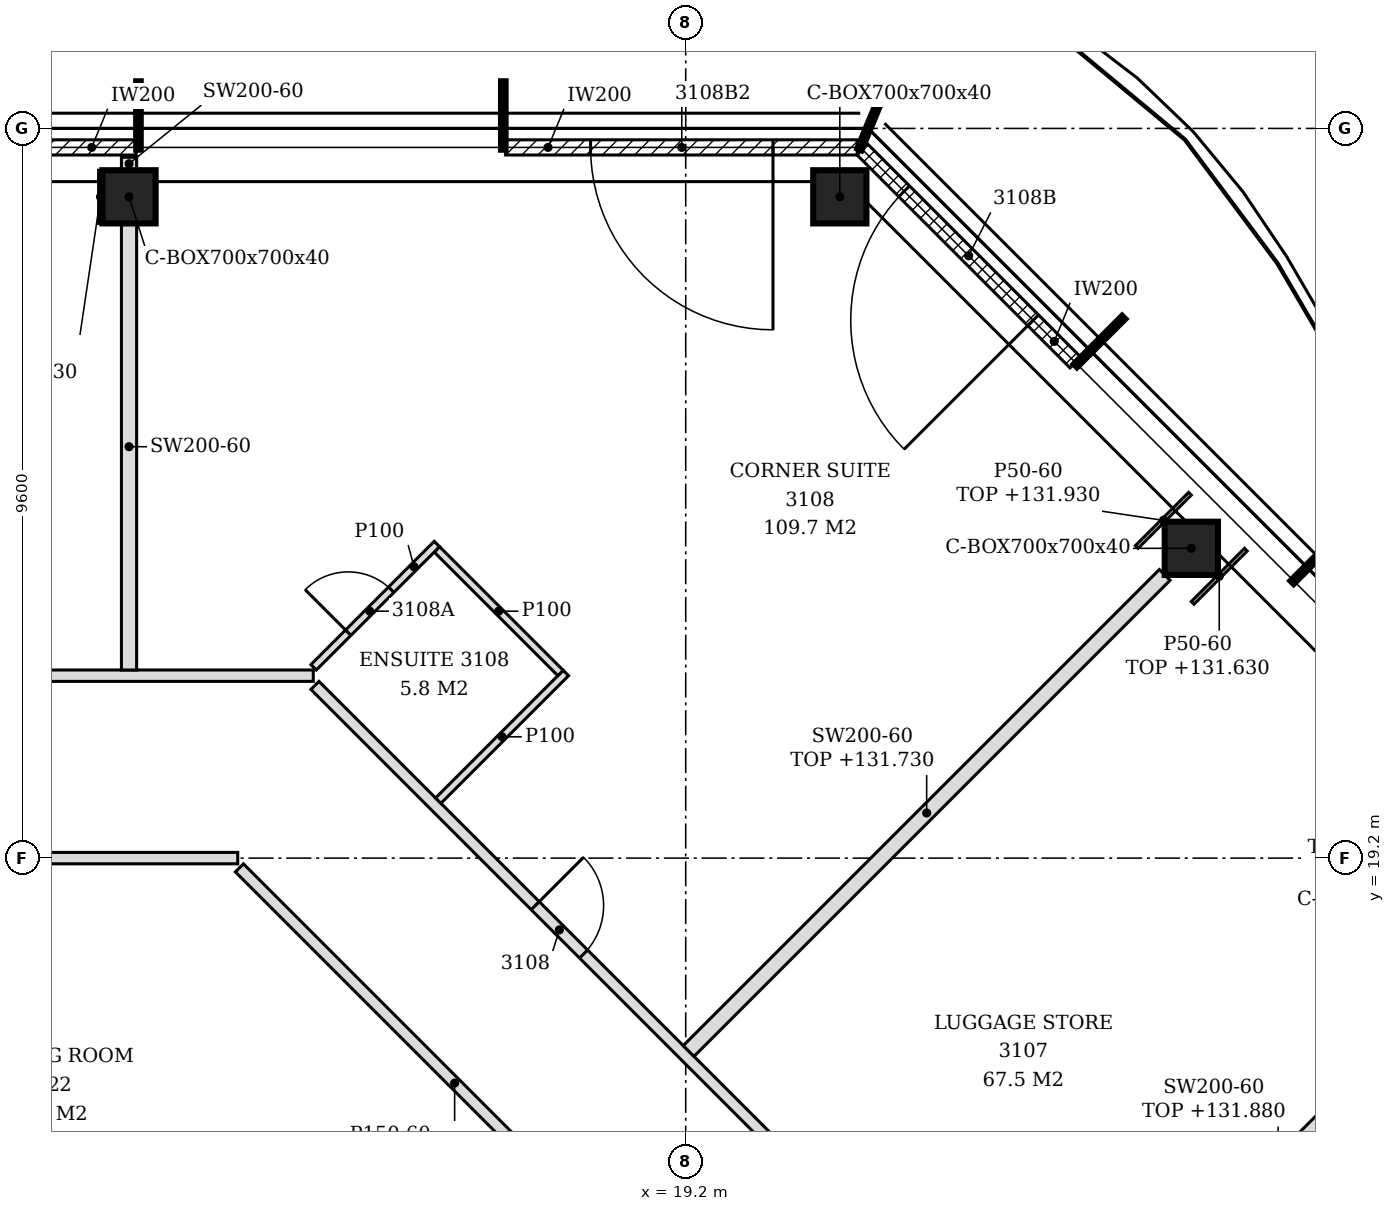
"""IFC4 building model, lengths in metres.
Left out: names, types, materials, properties, quantities, classifications, styles, units other than length and angle.
Written with IfcOpenShell. Run it as: python <this file> out.ifc"""

import sys

from ifc_helpers import new_model, si_unit, direction, frame, frame_2d, origin, origin_2d, place, context, subcontext, project, spatial, polyline, rectangle, hollow_rectangle, outline, extrude, element, fill, save


model = new_model("IFC4")
c1 = context("Model", 3, precision=1e-05, world=origin(), true_north=direction((0.0, 1.0)))
c2 = subcontext(c1, "Body", "Model", "MODEL_VIEW")
j1 = project(units=[si_unit("LENGTHUNIT", "METRE"), si_unit("PLANEANGLEUNIT", "RADIAN")], contexts=[c1])
p1 = place(None, origin())
s1 = spatial("IfcSite", under=j1, at=p1, CompositionType="ELEMENT")
p2 = place(p1, origin())
s2 = spatial("IfcBuilding", under=s1, at=p2, CompositionType="ELEMENT")
p3 = place(p2, frame((0.0, 0.0, 129.0)))
s3 = spatial("IfcBuildingStorey", under=s2, at=p3, CompositionType="ELEMENT", Elevation=129.0)
for number, where, z_axis, x_axis in (
    (1, (25.852, 23.276, -0.15), (0.0, 0.0, 1.0), (1.0, 0.0, 0.0)),
    (2, (21.227, 27.9, -0.15), (0.0, 0.0, 1.0), (1.0, 0.0, 0.0)),
    (3, (11.876, 27.9, -0.15), (0.0, 0.0, 1.0), (1.0, 0.0, 0.0)),
):
    element("IfcColumn", number, at=place(p3, frame(where, z_axis=z_axis, x_axis=x_axis)), inside=s3, PredefinedType="COLUMN", context=c2, shape_type="SweptSolid", body=[
        extrude(hollow_rectangle(XDim=0.7, YDim=0.7, WallThickness=0.04, at=origin_2d()), origin(), (0.0, 0.0, 1.0), 3.6),
    ])
p4 = place(p3, frame((24.326, 25.72, 0.0), z_axis=(0.0, 0.0, 1.0), x_axis=(-0.707106781187, 0.707106781187, 0.0)))
e4 = element("IfcWall", 4, at=p4, inside=s3, PredefinedType="NOTDEFINED", context=c2, shape_type="SweptSolid", body=[
    extrude(rectangle(XDim=3.962, YDim=0.2, at=frame_2d((1.981, 0.0))), origin(), (0.0, 0.0, 1.0), 3.45),
])
p5 = place(p4, frame((0.786, 0.0, 0.0)))
e5 = element("IfcOpeningElement", 5, at=p5, cuts=e4, PredefinedType="OPENING", context=c2, shape_type="SweptSolid", body=[
    extrude(rectangle(XDim=2.4, YDim=2.4, at=frame_2d((1.2, 1.2))), frame((0.0, 0.11, 0.0), z_axis=(0.0, -1.0, 0.0), x_axis=(1.0, 0.0, 0.0)), (0.0, 0.0, 1.0), 0.22),
])
p6 = place(p3, frame((21.457, 28.55, 0.0), z_axis=(0.0, 0.0, 1.0), x_axis=(-1.0, 0.0, 0.0)))
e6 = element("IfcWall", 6, at=p6, inside=s3, PredefinedType="NOTDEFINED", context=c2, shape_type="SweptSolid", body=[
    extrude(rectangle(XDim=4.626, YDim=0.2, at=frame_2d((2.313, 0.0))), origin(), (0.0, 0.0, 1.0), 3.45),
])
p7 = place(p6, frame((1.108, 0.0, 0.0)))
e7 = element("IfcOpeningElement", 7, at=p7, cuts=e6, PredefinedType="OPENING", context=c2, shape_type="SweptSolid", body=[
    extrude(rectangle(XDim=2.4, YDim=2.4, at=frame_2d((1.2, 1.2))), frame((0.0, 0.11, 0.0), z_axis=(0.0, -1.0, 0.0), x_axis=(1.0, 0.0, 0.0)), (0.0, 0.0, 1.0), 0.22),
])
p8 = place(p3, frame((11.97, 28.55, 0.0), z_axis=(0.0, 0.0, 1.0), x_axis=(-1.0, 0.0, 0.0)))
e8 = element("IfcWall", 8, at=p8, inside=s3, PredefinedType="NOTDEFINED", context=c2, shape_type="SweptSolid", body=[
    extrude(rectangle(XDim=4.74, YDim=0.2, at=frame_2d((2.37, 0.0))), origin(), (0.0, 0.0, 1.0), 3.45),
])
p9 = place(p8, frame((1.17, 0.0, 0.0)))
e9 = element("IfcOpeningElement", 9, at=p9, cuts=e8, PredefinedType="OPENING", context=c2, shape_type="SweptSolid", body=[
    extrude(rectangle(XDim=2.4, YDim=2.4, at=frame_2d((1.2, 1.2))), frame((0.0, 0.11, 0.0), z_axis=(0.0, -1.0, 0.0), x_axis=(1.0, 0.0, 0.0)), (0.0, 0.0, 1.0), 0.22),
])
p10 = place(p3, frame((31.072, 4.722, 0.0), z_axis=(0.0, 0.0, 1.0), x_axis=(-0.707106781187, 0.707106781187, 0.0)))
e10 = element("IfcWall", 10, at=p10, inside=s3, PredefinedType="PARTITIONING", context=c2, shape_type="SweptSolid", body=[
    extrude(rectangle(XDim=23.688, YDim=0.15, at=frame_2d((11.844, 0.0))), origin(), (0.0, 0.0, 1.0), 2.73),
])
p11 = place(p10, frame((8.135, 0.0, 0.0)))
e11 = element("IfcOpeningElement", 11, at=p11, cuts=e10, PredefinedType="OPENING", context=c2, shape_type="SweptSolid", body=[
    extrude(rectangle(XDim=0.9, YDim=2.1, at=frame_2d((0.45, 1.05))), frame((0.0, 0.085, 0.0), z_axis=(0.0, -1.0, 0.0), x_axis=(1.0, 0.0, 0.0)), (0.0, 0.0, 1.0), 0.17),
])
p12 = place(p10, frame((13.091, 0.0, 0.0)))
e12 = element("IfcOpeningElement", 12, at=p12, cuts=e10, PredefinedType="OPENING", context=c2, shape_type="SweptSolid", body=[
    extrude(rectangle(XDim=0.9, YDim=2.1, at=frame_2d((0.45, 1.05))), frame((0.0, 0.085, 0.0), z_axis=(0.0, -1.0, 0.0), x_axis=(1.0, 0.0, 0.0)), (0.0, 0.0, 1.0), 0.17),
])
p13 = place(p10, frame((18.69, 0.0, 0.0)))
e13 = element("IfcOpeningElement", 13, at=p13, cuts=e10, PredefinedType="OPENING", context=c2, shape_type="SweptSolid", body=[
    extrude(rectangle(XDim=0.9, YDim=2.1, at=frame_2d((0.45, 1.05))), frame((0.0, 0.085, 0.0), z_axis=(0.0, -1.0, 0.0), x_axis=(1.0, 0.0, 0.0)), (0.0, 0.0, 1.0), 0.17),
])
p14 = place(p3, frame((23.862, 12.038, 0.0), z_axis=(0.0, 0.0, 1.0), x_axis=(0.707106781187, 0.707106781187, 0.0)))
e14 = element("IfcWall", 14, at=p14, inside=s3, PredefinedType="PARTITIONING", context=c2, shape_type="SweptSolid", body=[
    extrude(rectangle(XDim=8.858, YDim=0.2, at=frame_2d((4.429, 0.0))), origin(), (0.0, 0.0, 1.0), 2.88),
])
p15 = place(p3, frame((18.991, 13.408, 0.0), z_axis=(0.0, 0.0, 1.0), x_axis=(-0.707106781187, 0.707106781187, 0.0)))
e15 = element("IfcWall", 15, at=p15, inside=s3, PredefinedType="PARTITIONING", context=c2, shape_type="SweptSolid", body=[
    extrude(rectangle(XDim=8.01, YDim=0.15, at=frame_2d((4.005, 0.0))), origin(), (0.0, 0.0, 1.0), 2.88),
])
p16 = place(p3, frame((19.238, 16.662, 0.0), z_axis=(0.0, 0.0, 1.0), x_axis=(0.707120561855, 0.707093000249, 0.0)))
e16 = element("IfcWall", 16, at=p16, inside=s3, PredefinedType="PARTITIONING", context=c2, shape_type="SweptSolid", body=[
    extrude(rectangle(XDim=8.858, YDim=0.2, at=frame_2d((4.429, 0.0))), origin(), (0.0, 0.0, 1.0), 2.73),
])
p17 = place(p3, frame((2.325, 19.2, 0.0), z_axis=(0.0, 0.0, 1.0), x_axis=(1.0, 0.0, 0.0)))
e17 = element("IfcWall", 17, at=p17, inside=s3, PredefinedType="PARTITIONING", context=c2, shape_type="SweptSolid", body=[
    extrude(outline(polyline([(0.0, 0.0), (10.981, 0.0), (10.981, 2.88), (5.025, 2.88), (5.023, 2.73), (4.725, 2.73), (4.723, 2.88), (0.0, 2.88), (0.0, 0.0)])), frame((0.0, 0.075, 0.0), z_axis=(0.0, -1.0, 0.0), x_axis=(1.0, 0.0, 0.0)), (0.0, 0.0, 1.0), 0.15),
])
p18 = place(p3, frame((15.944, 19.956, 0.0), z_axis=(0.0, 0.0, 1.0), x_axis=(0.707106781187, 0.707106781187, 0.0)))
e18 = element("IfcWall", 18, at=p18, inside=s3, PredefinedType="PARTITIONING", context=c2, shape_type="SweptSolid", body=[
    extrude(rectangle(XDim=2.375, YDim=0.1, at=frame_2d((1.188, 0.0))), origin(), (0.0, 0.0, 1.0), 3.45),
])
p19 = place(p3, frame((0.1, 21.6, 0.0), z_axis=(0.0, 0.0, 1.0), x_axis=(1.0, 0.0, 0.0)))
e19 = element("IfcWall", 19, at=p19, inside=s3, PredefinedType="PARTITIONING", context=c2, shape_type="SweptSolid", body=[
    extrude(outline(polyline([(0.0, 0.0), (14.2, 0.0), (14.2, 3.45), (7.25, 3.45), (7.248, 2.73), (6.95, 2.73), (6.948, 3.45), (0.0, 3.45), (0.0, 0.0)])), frame((0.0, 0.075, 0.0), z_axis=(0.0, -1.0, 0.0), x_axis=(1.0, 0.0, 0.0)), (0.0, 0.0, 1.0), 0.15),
])
p20 = place(p19, frame((6.65, 0.0, 0.0)))
e20 = element("IfcOpeningElement", 20, at=p20, cuts=e19, PredefinedType="OPENING", context=c2, shape_type="SweptSolid", body=[
    extrude(rectangle(XDim=0.9, YDim=2.1, at=frame_2d((0.45, 1.05))), frame((0.0, 0.085, 0.0), z_axis=(0.0, -1.0, 0.0), x_axis=(1.0, 0.0, 0.0)), (0.0, 0.0, 1.0), 0.17),
])
p21 = place(p3, frame((17.552, 21.635, 0.0), z_axis=(0.0, 0.0, 1.0), x_axis=(-0.707053697085, 0.707159861304, 0.0)))
e21 = element("IfcWall", 21, at=p21, inside=s3, PredefinedType="PARTITIONING", context=c2, shape_type="SweptSolid", body=[
    extrude(rectangle(XDim=2.3, YDim=0.1, at=frame_2d((1.15, 0.0))), origin(), (0.0, 0.0, 1.0), 3.45),
])
p22 = place(p3, frame((11.876, 21.675, 0.0), z_axis=(0.0, 0.0, 1.0), x_axis=(0.0, 1.0, 0.0)))
e22 = element("IfcWall", 22, at=p22, inside=s3, PredefinedType="PARTITIONING", context=c2, shape_type="SweptSolid", body=[
    extrude(outline(polyline([(0.0, 0.0), (5.875, 0.0), (5.875, 3.45), (2.43, 3.45), (2.428, 2.88), (2.22, 2.88), (2.218, 3.45), (0.0, 3.45), (0.0, 0.0)])), frame((0.0, 0.1, 0.0), z_axis=(0.0, -1.0, 0.0), x_axis=(1.0, 0.0, 0.0)), (0.0, 0.0, 1.0), 0.2),
])
p23 = place(p3, frame((14.304, 21.71, 0.0), z_axis=(0.0, 0.0, 1.0), x_axis=(0.707106781187, 0.707106781187, 0.0)))
e23 = element("IfcWall", 23, at=p23, inside=s3, PredefinedType="PARTITIONING", context=c2, shape_type="SweptSolid", body=[
    extrude(rectangle(XDim=2.294, YDim=0.1, at=frame_2d((1.147, 0.0))), origin(), (0.0, 0.0, 1.0), 3.45),
])
p24 = place(p23, frame((0.644, 0.0, 0.0)))
e24 = element("IfcOpeningElement", 24, at=p24, cuts=e23, PredefinedType="OPENING", context=c2, shape_type="SweptSolid", body=[
    extrude(rectangle(XDim=0.8, YDim=2.1, at=frame_2d((0.4, 1.05))), frame((0.0, 0.06, 0.0), z_axis=(0.0, -1.0, 0.0), x_axis=(1.0, 0.0, 0.0)), (0.0, 0.0, 1.0), 0.12),
])
p25 = place(p3, frame((11.876, 28.25, 0.0), z_axis=(0.0, 0.0, 1.0), x_axis=(0.0, 1.0, 0.0)))
e25 = element("IfcWall", 25, at=p25, inside=s3, PredefinedType="PARTITIONING", context=c2, shape_type="SweptSolid", body=[
    extrude(rectangle(XDim=0.17, YDim=0.2, at=frame_2d((0.085, 0.0))), origin(), (0.0, 0.0, 1.0), 3.45),
])
p26 = place(p3, frame((25.134, 23.293, 0.0), z_axis=(0.0, 0.0, 1.0), x_axis=(0.707106781187, 0.707106781187, 0.0)))
e26 = element("IfcWall", 26, at=p26, inside=s3, PredefinedType="PARTITIONING", context=c2, shape_type="SweptSolid", body=[
    extrude(rectangle(XDim=0.99, YDim=0.05, at=frame_2d((0.495, 0.0))), origin(), (0.0, 0.0, 1.0), 2.93),
])
p27 = place(p3, frame((25.869, 22.558, 0.0), z_axis=(0.0, 0.0, 1.0), x_axis=(0.707106781187, 0.707106781187, 0.0)))
e27 = element("IfcWall", 27, at=p27, inside=s3, PredefinedType="PARTITIONING", context=c2, shape_type="SweptSolid", body=[
    extrude(rectangle(XDim=0.99, YDim=0.05, at=frame_2d((0.495, 0.0))), origin(), (0.0, 0.0, 1.0), 2.63),
])
p28 = place(p3, frame((11.501, 27.55, 0.0), z_axis=(0.0, 0.0, 1.0), x_axis=(0.0, 1.0, 0.0)))
e28 = element("IfcWall", 28, at=p28, inside=s3, PredefinedType="PARTITIONING", context=c2, shape_type="SweptSolid", body=[
    extrude(rectangle(XDim=0.7, YDim=0.05, at=frame_2d((0.35, 0.0))), origin(), (0.0, 0.0, 1.0), 2.93),
])
p29 = place(p5, origin())
e29 = element("IfcDoor", 29, at=p29, inside=s3, OperationType="SINGLE_SWING_LEFT", PredefinedType="DOOR", context=c2, shape_type="SweptSolid", body=[
    extrude(rectangle(XDim=2.4, YDim=2.4, at=frame_2d((1.2, 1.2))), frame((0.0, 0.025, 0.0), z_axis=(0.0, -1.0, 0.0), x_axis=(1.0, 0.0, 0.0)), (0.0, 0.0, 1.0), 0.05),
])
fill(e5, e29)
p30 = place(p7, origin())
e30 = element("IfcDoor", 30, at=p30, inside=s3, OperationType="SINGLE_SWING_LEFT", PredefinedType="DOOR", context=c2, shape_type="SweptSolid", body=[
    extrude(rectangle(XDim=2.4, YDim=2.4, at=frame_2d((1.2, 1.2))), frame((0.0, 0.025, 0.0), z_axis=(0.0, -1.0, 0.0), x_axis=(1.0, 0.0, 0.0)), (0.0, 0.0, 1.0), 0.05),
])
fill(e7, e30)
p31 = place(p13, frame((0.9, 0.0, 0.0), z_axis=(0.0, 0.0, 1.0), x_axis=(-1.0, 0.0, 0.0)))
e31 = element("IfcDoor", 31, at=p31, inside=s3, OperationType="SINGLE_SWING_LEFT", PredefinedType="DOOR", context=c2, shape_type="SweptSolid", body=[
    extrude(rectangle(XDim=0.9, YDim=2.1, at=frame_2d((0.45, 1.05))), frame((0.0, 0.025, 0.0), z_axis=(0.0, -1.0, 0.0), x_axis=(1.0, 0.0, 0.0)), (0.0, 0.0, 1.0), 0.05),
])
fill(e13, e31)
p32 = place(p24, origin())
e32 = element("IfcDoor", 32, at=p32, inside=s3, OperationType="SINGLE_SWING_LEFT", PredefinedType="DOOR", context=c2, shape_type="SweptSolid", body=[
    extrude(rectangle(XDim=0.8, YDim=2.1, at=frame_2d((0.4, 1.05))), frame((0.0, 0.025, 0.0), z_axis=(0.0, -1.0, 0.0), x_axis=(1.0, 0.0, 0.0)), (0.0, 0.0, 1.0), 0.05),
])
fill(e24, e32)
save(model, sys.argv[1])
